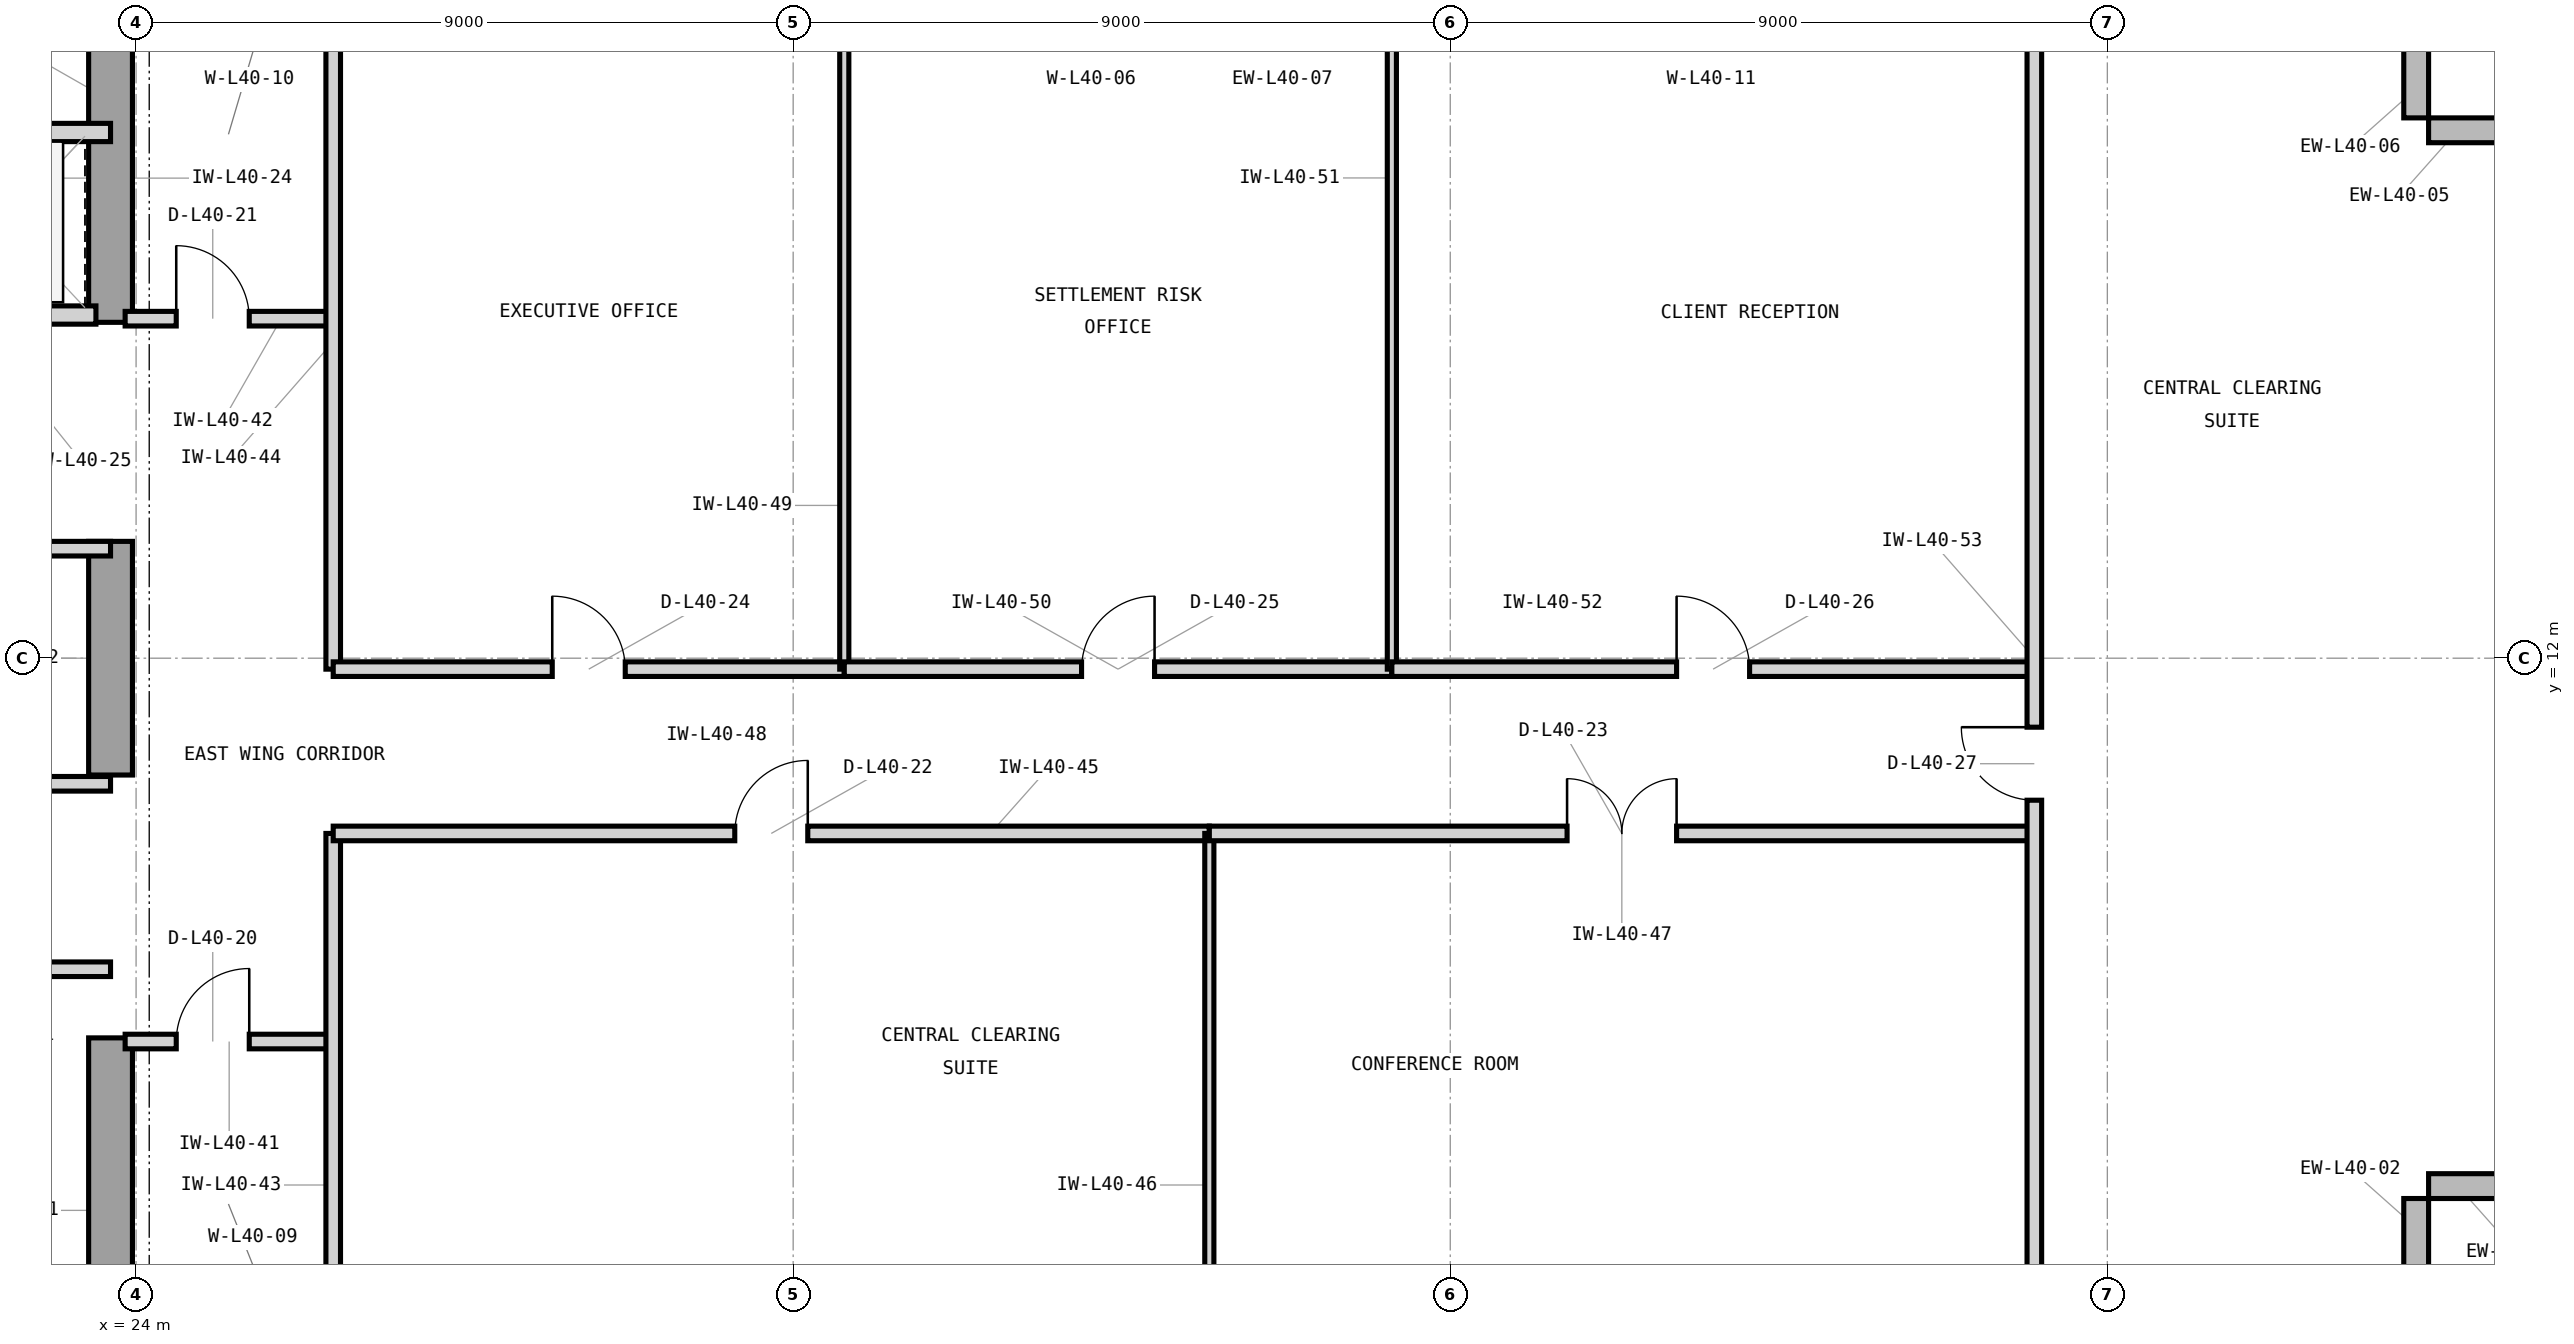
"""IFC4 building model, lengths in metres.
Left out: names, types, materials, properties, quantities, classifications, styles, units other than length and angle.
Written with IfcOpenShell. Run it as: python <this file> out.ifc"""

import sys

from ifc_helpers import new_model, si_unit, direction, frame, frame_2d, origin, place, context, subcontext, project, spatial, rectangle, extrude, element, fill, save


model = new_model("IFC4")
c1 = context("Model", 3, precision=1e-05, world=origin(), true_north=direction((0.0, 1.0)))
c2 = subcontext(c1, "Body", "Model", "MODEL_VIEW")
j1 = project(units=[si_unit("LENGTHUNIT", "METRE"), si_unit("PLANEANGLEUNIT", "RADIAN")], contexts=[c1])
p1 = place(None, origin())
s1 = spatial("IfcSite", under=j1, at=p1, CompositionType="ELEMENT")
p2 = place(p1, origin())
s2 = spatial("IfcBuilding", under=s1, at=p2, CompositionType="ELEMENT")
p3 = place(p2, frame((0.0, 0.0, 168.3)))
s3 = spatial("IfcBuildingStorey", under=s2, at=p3, CompositionType="ELEMENT", Elevation=168.3)
p4 = place(p3, frame((23.65, 3.65, 0.0), z_axis=(0.0, 0.0, 1.0), x_axis=(0.0, 1.0, 0.0)))
e1 = element("IfcWall", 1, at=p4, inside=s3, PredefinedType="SHEAR", context=c2, shape_type="SweptSolid", body=[
    extrude(rectangle(XDim=3.15, YDim=0.6, at=frame_2d((1.575, 0.0))), origin(), (0.0, 0.0, 1.0), 3.9),
])
p5 = place(p3, frame((23.65, 10.4, 0.0), z_axis=(0.0, 0.0, 1.0), x_axis=(0.0, 1.0, 0.0)))
e2 = element("IfcWall", 2, at=p5, inside=s3, PredefinedType="SHEAR", context=c2, shape_type="SweptSolid", body=[
    extrude(rectangle(XDim=3.2, YDim=0.6, at=frame_2d((1.6, 0.0))), origin(), (0.0, 0.0, 1.0), 3.9),
])
p6 = place(p3, frame((23.65, 16.6, 0.0), z_axis=(0.0, 0.0, 1.0), x_axis=(0.0, 1.0, 0.0)))
e3 = element("IfcWall", 3, at=p6, inside=s3, PredefinedType="SHEAR", context=c2, shape_type="SweptSolid", body=[
    extrude(rectangle(XDim=4.05, YDim=0.6, at=frame_2d((2.025, 0.0))), origin(), (0.0, 0.0, 1.0), 3.9),
])
for number, where, z_axis, x_axis in (
    (4, (55.23, 3.0, 0.0), (0.0, 0.0, 1.0), (0.0, 1.0, 0.0)),
    (5, (55.4, 4.77, 0.0), (0.0, 0.0, 1.0), (1.0, 0.0, 0.0)),
    (6, (57.0, 19.23, 0.0), (0.0, 0.0, 1.0), (-1.0, 0.0, 0.0)),
    (7, (55.23, 19.4, 0.0), (0.0, 0.0, 1.0), (0.0, 1.0, 0.0)),
):
    element("IfcWall", number, at=place(p3, frame(where, z_axis=z_axis, x_axis=x_axis)), inside=s3, PredefinedType="STANDARD", context=c2, shape_type="SweptSolid", body=[
        extrude(rectangle(XDim=1.6, YDim=0.34, at=frame_2d((0.8, 0.0))), origin(), (0.0, 0.0, 1.0), 3.7),
    ])
p7 = place(p3, frame((21.05, 16.7, 0.0), z_axis=(0.0, 0.0, 1.0), x_axis=(1.0, 0.0, 0.0)))
e8 = element("IfcWall", 8, at=p7, inside=s3, PredefinedType="PARTITIONING", context=c2, shape_type="SweptSolid", body=[
    extrude(rectangle(XDim=2.4, YDim=0.25, at=frame_2d((1.2, 0.0))), origin(), (0.0, 0.0, 1.0), 3.283),
])
p8 = place(p7, frame((0.52, 0.0, 0.0)))
e9 = element("IfcOpeningElement", 9, at=p8, cuts=e8, PredefinedType="OPENING", context=c2, shape_type="SweptSolid", body=[
    extrude(rectangle(XDim=1.15, YDim=2.25, at=frame_2d((0.575, 1.125))), frame((0.0, 0.135, 0.0), z_axis=(0.0, -1.0, 0.0), x_axis=(1.0, 0.0, 0.0)), (0.0, 0.0, 1.0), 0.27),
])
p9 = place(p3, frame((16.45, 19.2, 0.0), z_axis=(0.0, 0.0, 1.0), x_axis=(1.0, 0.0, 0.0)))
e10 = element("IfcWall", 10, at=p9, inside=s3, PredefinedType="PARTITIONING", context=c2, shape_type="SweptSolid", body=[
    extrude(rectangle(XDim=7.2, YDim=0.25, at=frame_2d((3.6, 0.0))), origin(), (0.0, 0.0, 1.0), 3.69),
])
p10 = place(p3, frame((20.65, 7.74, 0.0), z_axis=(0.0, 0.0, 1.0), x_axis=(1.0, 0.0, 0.0)))
e11 = element("IfcWall", 11, at=p10, inside=s3, PredefinedType="PARTITIONING", context=c2, shape_type="SweptSolid", body=[
    extrude(rectangle(XDim=3.0, YDim=0.2, at=frame_2d((1.5, 0.0))), origin(), (0.0, 0.0, 1.0), 3.69),
])
p11 = place(p10, frame((1.025, 0.0, 0.0)))
e12 = element("IfcOpeningElement", 12, at=p11, cuts=e11, PredefinedType="OPENING", context=c2, shape_type="SweptSolid", body=[
    extrude(rectangle(XDim=0.95, YDim=2.1, at=frame_2d((0.475, 1.05))), frame((0.0, 0.11, 0.0), z_axis=(0.0, -1.0, 0.0), x_axis=(1.0, 0.0, 0.0)), (0.0, 0.0, 1.0), 0.22),
])
p12 = place(p3, frame((14.825, 10.28, 0.0), z_axis=(0.0, 0.0, 1.0), x_axis=(1.0, 0.0, 0.0)))
e13 = element("IfcWall", 13, at=p12, inside=s3, PredefinedType="PARTITIONING", context=c2, shape_type="SweptSolid", body=[
    extrude(rectangle(XDim=8.825, YDim=0.2, at=frame_2d((4.413, 0.0))), origin(), (0.0, 0.0, 1.0), 3.69),
])
p13 = place(p3, frame((18.45, 13.5, 0.0), z_axis=(0.0, 0.0, 1.0), x_axis=(1.0, 0.0, 0.0)))
e14 = element("IfcWall", 14, at=p13, inside=s3, PredefinedType="PARTITIONING", context=c2, shape_type="SweptSolid", body=[
    extrude(rectangle(XDim=5.2, YDim=0.2, at=frame_2d((2.6, 0.0))), origin(), (0.0, 0.0, 1.0), 3.283),
])
p14 = place(p13, frame((2.125, 0.0, 0.0)))
e15 = element("IfcOpeningElement", 15, at=p14, cuts=e14, PredefinedType="OPENING", context=c2, shape_type="SweptSolid", body=[
    extrude(rectangle(XDim=0.95, YDim=2.1, at=frame_2d((0.475, 1.05))), frame((0.0, 0.11, 0.0), z_axis=(0.0, -1.0, 0.0), x_axis=(1.0, 0.0, 0.0)), (0.0, 0.0, 1.0), 0.22),
])
p15 = place(p3, frame((23.85, 6.75, 0.0), z_axis=(0.0, 0.0, 1.0), x_axis=(1.0, 0.0, 0.0)))
e16 = element("IfcWall", 16, at=p15, inside=s3, PredefinedType="PARTITIONING", context=c2, shape_type="SweptSolid", body=[
    extrude(rectangle(XDim=2.85, YDim=0.2, at=frame_2d((1.425, 0.0))), origin(), (0.0, 0.0, 1.0), 3.69),
])
p16 = place(p15, frame((0.7, 0.0, 0.0)))
e17 = element("IfcOpeningElement", 17, at=p16, cuts=e16, PredefinedType="OPENING", context=c2, shape_type="SweptSolid", body=[
    extrude(rectangle(XDim=1.0, YDim=2.15, at=frame_2d((0.5, 1.075))), frame((0.0, 0.11, 0.0), z_axis=(0.0, -1.0, 0.0), x_axis=(1.0, 0.0, 0.0)), (0.0, 0.0, 1.0), 0.22),
])
p17 = place(p3, frame((23.85, 16.65, 0.0), z_axis=(0.0, 0.0, 1.0), x_axis=(1.0, 0.0, 0.0)))
e18 = element("IfcWall", 18, at=p17, inside=s3, PredefinedType="PARTITIONING", context=c2, shape_type="SweptSolid", body=[
    extrude(rectangle(XDim=2.85, YDim=0.2, at=frame_2d((1.425, 0.0))), origin(), (0.0, 0.0, 1.0), 3.69),
])
p18 = place(p17, frame((0.7, 0.0, 0.0)))
e19 = element("IfcOpeningElement", 19, at=p18, cuts=e18, PredefinedType="OPENING", context=c2, shape_type="SweptSolid", body=[
    extrude(rectangle(XDim=1.0, YDim=2.15, at=frame_2d((0.5, 1.075))), frame((0.0, 0.11, 0.0), z_axis=(0.0, -1.0, 0.0), x_axis=(1.0, 0.0, 0.0)), (0.0, 0.0, 1.0), 0.22),
])
p19 = place(p3, frame((26.7, 3.18, 0.0), z_axis=(0.0, 0.0, 1.0), x_axis=(0.0, 1.0, 0.0)))
e20 = element("IfcWall", 20, at=p19, inside=s3, PredefinedType="PARTITIONING", context=c2, shape_type="SweptSolid", body=[
    extrude(rectangle(XDim=6.42, YDim=0.2, at=frame_2d((3.21, 0.0))), origin(), (0.0, 0.0, 1.0), 3.69),
])
p20 = place(p3, frame((26.7, 11.85, 0.0), z_axis=(0.0, 0.0, 1.0), x_axis=(0.0, 1.0, 0.0)))
e21 = element("IfcWall", 21, at=p20, inside=s3, PredefinedType="PARTITIONING", context=c2, shape_type="SweptSolid", body=[
    extrude(rectangle(XDim=8.97, YDim=0.2, at=frame_2d((4.485, 0.0))), origin(), (0.0, 0.0, 1.0), 3.69),
])
p21 = place(p3, frame((26.7, 9.6, 0.0), z_axis=(0.0, 0.0, 1.0), x_axis=(1.0, 0.0, 0.0)))
e22 = element("IfcWall", 22, at=p21, inside=s3, PredefinedType="PARTITIONING", context=c2, shape_type="SweptSolid", body=[
    extrude(rectangle(XDim=12.0, YDim=0.2, at=frame_2d((6.0, 0.0))), origin(), (0.0, 0.0, 1.0), 3.69),
])
p22 = place(p21, frame((5.5, 0.0, 0.0)))
e23 = element("IfcOpeningElement", 23, at=p22, cuts=e22, PredefinedType="OPENING", context=c2, shape_type="SweptSolid", body=[
    extrude(rectangle(XDim=1.0, YDim=2.15, at=frame_2d((0.5, 1.075))), frame((0.0, 0.11, 0.0), z_axis=(0.0, -1.0, 0.0), x_axis=(1.0, 0.0, 0.0)), (0.0, 0.0, 1.0), 0.22),
])
p23 = place(p3, frame((38.7, 3.18, 0.0), z_axis=(0.0, 0.0, 1.0), x_axis=(0.0, 1.0, 0.0)))
e24 = element("IfcWall", 24, at=p23, inside=s3, PredefinedType="PARTITIONING", context=c2, shape_type="SweptSolid", body=[
    extrude(rectangle(XDim=6.42, YDim=0.125, at=frame_2d((3.21, 0.0))), origin(), (0.0, 0.0, 1.0), 3.69),
])
p24 = place(p3, frame((38.7, 9.6, 0.0), z_axis=(0.0, 0.0, 1.0), x_axis=(1.0, 0.0, 0.0)))
e25 = element("IfcWall", 25, at=p24, inside=s3, PredefinedType="PARTITIONING", context=c2, shape_type="SweptSolid", body=[
    extrude(rectangle(XDim=11.3, YDim=0.2, at=frame_2d((5.65, 0.0))), origin(), (0.0, 0.0, 1.0), 3.69),
])
p25 = place(p24, frame((4.9, 0.0, 0.0)))
e26 = element("IfcOpeningElement", 26, at=p25, cuts=e25, PredefinedType="OPENING", context=c2, shape_type="SweptSolid", body=[
    extrude(rectangle(XDim=1.5, YDim=2.3, at=frame_2d((0.75, 1.15))), frame((0.0, 0.11, 0.0), z_axis=(0.0, -1.0, 0.0), x_axis=(1.0, 0.0, 0.0)), (0.0, 0.0, 1.0), 0.22),
])
p26 = place(p3, frame((26.7, 11.85, 0.0), z_axis=(0.0, 0.0, 1.0), x_axis=(1.0, 0.0, 0.0)))
e27 = element("IfcWall", 27, at=p26, inside=s3, PredefinedType="PARTITIONING", context=c2, shape_type="SweptSolid", body=[
    extrude(rectangle(XDim=7.0, YDim=0.2, at=frame_2d((3.5, 0.0))), origin(), (0.0, 0.0, 1.0), 3.69),
])
p27 = place(p26, frame((3.0, 0.0, 0.0)))
e28 = element("IfcOpeningElement", 28, at=p27, cuts=e27, PredefinedType="OPENING", context=c2, shape_type="SweptSolid", body=[
    extrude(rectangle(XDim=1.0, YDim=2.15, at=frame_2d((0.5, 1.075))), frame((0.0, 0.11, 0.0), z_axis=(0.0, -1.0, 0.0), x_axis=(1.0, 0.0, 0.0)), (0.0, 0.0, 1.0), 0.22),
])
p28 = place(p3, frame((33.7, 11.85, 0.0), z_axis=(0.0, 0.0, 1.0), x_axis=(0.0, 1.0, 0.0)))
e29 = element("IfcWall", 29, at=p28, inside=s3, PredefinedType="PARTITIONING", context=c2, shape_type="SweptSolid", body=[
    extrude(rectangle(XDim=8.97, YDim=0.125, at=frame_2d((4.485, 0.0))), origin(), (0.0, 0.0, 1.0), 3.69),
])
p29 = place(p3, frame((33.7, 11.85, 0.0), z_axis=(0.0, 0.0, 1.0), x_axis=(1.0, 0.0, 0.0)))
e30 = element("IfcWall", 30, at=p29, inside=s3, PredefinedType="PARTITIONING", context=c2, shape_type="SweptSolid", body=[
    extrude(rectangle(XDim=7.5, YDim=0.2, at=frame_2d((3.75, 0.0))), origin(), (0.0, 0.0, 1.0), 3.69),
])
p30 = place(p29, frame((3.25, 0.0, 0.0)))
e31 = element("IfcOpeningElement", 31, at=p30, cuts=e30, PredefinedType="OPENING", context=c2, shape_type="SweptSolid", body=[
    extrude(rectangle(XDim=1.0, YDim=2.15, at=frame_2d((0.5, 1.075))), frame((0.0, 0.11, 0.0), z_axis=(0.0, -1.0, 0.0), x_axis=(1.0, 0.0, 0.0)), (0.0, 0.0, 1.0), 0.22),
])
p31 = place(p3, frame((41.2, 11.85, 0.0), z_axis=(0.0, 0.0, 1.0), x_axis=(0.0, 1.0, 0.0)))
e32 = element("IfcWall", 32, at=p31, inside=s3, PredefinedType="PARTITIONING", context=c2, shape_type="SweptSolid", body=[
    extrude(rectangle(XDim=8.97, YDim=0.125, at=frame_2d((4.485, 0.0))), origin(), (0.0, 0.0, 1.0), 3.69),
])
p32 = place(p3, frame((41.2, 11.85, 0.0), z_axis=(0.0, 0.0, 1.0), x_axis=(1.0, 0.0, 0.0)))
e33 = element("IfcWall", 33, at=p32, inside=s3, PredefinedType="PARTITIONING", context=c2, shape_type="SweptSolid", body=[
    extrude(rectangle(XDim=8.8, YDim=0.2, at=frame_2d((4.4, 0.0))), origin(), (0.0, 0.0, 1.0), 3.69),
])
p33 = place(p32, frame((3.9, 0.0, 0.0)))
e34 = element("IfcOpeningElement", 34, at=p33, cuts=e33, PredefinedType="OPENING", context=c2, shape_type="SweptSolid", body=[
    extrude(rectangle(XDim=1.0, YDim=2.15, at=frame_2d((0.5, 1.075))), frame((0.0, 0.11, 0.0), z_axis=(0.0, -1.0, 0.0), x_axis=(1.0, 0.0, 0.0)), (0.0, 0.0, 1.0), 0.22),
])
p34 = place(p3, frame((50.0, 3.18, 0.0), z_axis=(0.0, 0.0, 1.0), x_axis=(0.0, 1.0, 0.0)))
e35 = element("IfcWall", 35, at=p34, inside=s3, PredefinedType="PARTITIONING", context=c2, shape_type="SweptSolid", body=[
    extrude(rectangle(XDim=17.64, YDim=0.2, at=frame_2d((8.82, 0.0))), origin(), (0.0, 0.0, 1.0), 3.69),
])
p35 = place(p34, frame((6.875, 0.0, 0.0)))
e36 = element("IfcOpeningElement", 36, at=p35, cuts=e35, PredefinedType="OPENING", context=c2, shape_type="SweptSolid", body=[
    extrude(rectangle(XDim=1.0, YDim=2.15, at=frame_2d((0.5, 1.075))), frame((0.0, 0.11, 0.0), z_axis=(0.0, -1.0, 0.0), x_axis=(1.0, 0.0, 0.0)), (0.0, 0.0, 1.0), 0.22),
])
p36 = place(p16, origin())
e37 = element("IfcDoor", 37, at=p36, inside=s3, OperationType="SINGLE_SWING_RIGHT", PredefinedType="DOOR", context=c2, shape_type="SweptSolid", body=[
    extrude(rectangle(XDim=1.0, YDim=2.15, at=frame_2d((0.5, 1.075))), frame((0.0, 0.025, 0.0), z_axis=(0.0, -1.0, 0.0), x_axis=(1.0, 0.0, 0.0)), (0.0, 0.0, 1.0), 0.05),
])
fill(e17, e37)
p37 = place(p18, origin())
e38 = element("IfcDoor", 38, at=p37, inside=s3, OperationType="SINGLE_SWING_LEFT", PredefinedType="DOOR", context=c2, shape_type="SweptSolid", body=[
    extrude(rectangle(XDim=1.0, YDim=2.15, at=frame_2d((0.5, 1.075))), frame((0.0, 0.025, 0.0), z_axis=(0.0, -1.0, 0.0), x_axis=(1.0, 0.0, 0.0)), (0.0, 0.0, 1.0), 0.05),
])
fill(e19, e38)
p38 = place(p22, origin())
e39 = element("IfcDoor", 39, at=p38, inside=s3, OperationType="SINGLE_SWING_RIGHT", PredefinedType="DOOR", context=c2, shape_type="SweptSolid", body=[
    extrude(rectangle(XDim=1.0, YDim=2.15, at=frame_2d((0.5, 1.075))), frame((0.0, 0.025, 0.0), z_axis=(0.0, -1.0, 0.0), x_axis=(1.0, 0.0, 0.0)), (0.0, 0.0, 1.0), 0.05),
])
fill(e23, e39)
p39 = place(p25, origin())
e40 = element("IfcDoor", 40, at=p39, inside=s3, OperationType="DOUBLE_DOOR_SINGLE_SWING", PredefinedType="DOOR", context=c2, shape_type="SweptSolid", body=[
    extrude(rectangle(XDim=1.5, YDim=2.3, at=frame_2d((0.75, 1.15))), frame((0.0, 0.025, 0.0), z_axis=(0.0, -1.0, 0.0), x_axis=(1.0, 0.0, 0.0)), (0.0, 0.0, 1.0), 0.05),
])
fill(e26, e40)
p40 = place(p27, origin())
e41 = element("IfcDoor", 41, at=p40, inside=s3, OperationType="SINGLE_SWING_LEFT", PredefinedType="DOOR", context=c2, shape_type="SweptSolid", body=[
    extrude(rectangle(XDim=1.0, YDim=2.15, at=frame_2d((0.5, 1.075))), frame((0.0, 0.025, 0.0), z_axis=(0.0, -1.0, 0.0), x_axis=(1.0, 0.0, 0.0)), (0.0, 0.0, 1.0), 0.05),
])
fill(e28, e41)
p41 = place(p30, origin())
e42 = element("IfcDoor", 42, at=p41, inside=s3, OperationType="SINGLE_SWING_RIGHT", PredefinedType="DOOR", context=c2, shape_type="SweptSolid", body=[
    extrude(rectangle(XDim=1.0, YDim=2.15, at=frame_2d((0.5, 1.075))), frame((0.0, 0.025, 0.0), z_axis=(0.0, -1.0, 0.0), x_axis=(1.0, 0.0, 0.0)), (0.0, 0.0, 1.0), 0.05),
])
fill(e31, e42)
p42 = place(p33, origin())
e43 = element("IfcDoor", 43, at=p42, inside=s3, OperationType="SINGLE_SWING_LEFT", PredefinedType="DOOR", context=c2, shape_type="SweptSolid", body=[
    extrude(rectangle(XDim=1.0, YDim=2.15, at=frame_2d((0.5, 1.075))), frame((0.0, 0.025, 0.0), z_axis=(0.0, -1.0, 0.0), x_axis=(1.0, 0.0, 0.0)), (0.0, 0.0, 1.0), 0.05),
])
fill(e34, e43)
p43 = place(p35, origin())
e44 = element("IfcDoor", 44, at=p43, inside=s3, OperationType="SINGLE_SWING_RIGHT", PredefinedType="DOOR", context=c2, shape_type="SweptSolid", body=[
    extrude(rectangle(XDim=1.0, YDim=2.15, at=frame_2d((0.5, 1.075))), frame((0.0, 0.025, 0.0), z_axis=(0.0, -1.0, 0.0), x_axis=(1.0, 0.0, 0.0)), (0.0, 0.0, 1.0), 0.05),
])
fill(e36, e44)
save(model, sys.argv[1])
